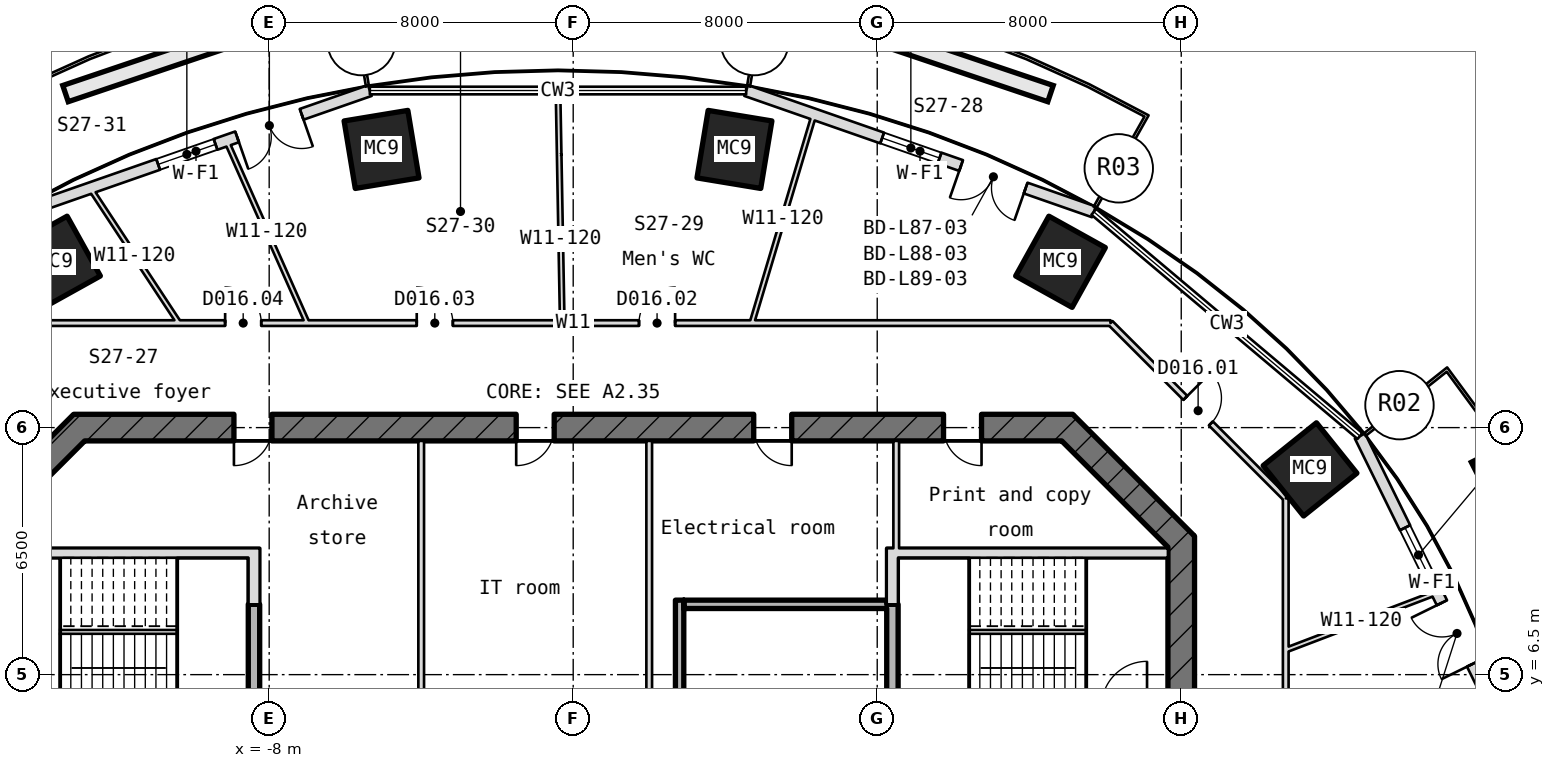
"""IFC4 building model, lengths in metres.
Left out: names, types, materials, properties, quantities, classifications, styles, units other than length and angle.
Written with IfcOpenShell. Run it as: python <this file> out.ifc"""

import sys

from ifc_helpers import new_model, si_unit, direction, frame, frame_2d, origin, origin_2d, place, context, subcontext, project, spatial, rectangle, hollow_rectangle, extrude, element, fill, save


model = new_model("IFC4")
c1 = context("Model", 3, precision=1e-05, world=origin(), true_north=direction((0.0, 1.0)))
c2 = subcontext(c1, "Body", "Model", "MODEL_VIEW")
j1 = project(units=[si_unit("LENGTHUNIT", "METRE"), si_unit("PLANEANGLEUNIT", "RADIAN")], contexts=[c1])
p1 = place(None, origin())
s1 = spatial("IfcSite", under=j1, at=p1, CompositionType="ELEMENT")
p2 = place(p1, origin())
s2 = spatial("IfcBuilding", under=s1, at=p2, CompositionType="ELEMENT")
p3 = place(p2, frame((0.0, 0.0, 384.1)))
s3 = spatial("IfcBuildingStorey", under=s2, at=p3, CompositionType="ELEMENT", Elevation=384.1)
for number, where, z_axis, x_axis in (
    (1, (19.389, 11.9, -0.18), (0.0, 0.0, 1.0), (0.626, -0.78, 0.0)),
    (2, (12.823, 17.363, -0.18), (0.0, 0.0, 1.0), (0.874, -0.486, 0.0)),
    (3, (4.243, 20.32, -0.18), (0.0, 0.0, 1.0), (0.987, -0.163, 0.0)),
    (4, (-5.043, 20.32, -0.18), (0.0, 0.0, 1.0), (0.987, 0.163, 0.0)),
    (5, (-13.623, 17.363, -0.18), (0.0, 0.0, 1.0), (0.874, 0.486, 0.0)),
):
    element("IfcColumn", number, at=place(p3, frame(where, z_axis=z_axis, x_axis=x_axis)), inside=s3, PredefinedType="COLUMN", context=c2, shape_type="SweptSolid", body=[
        extrude(hollow_rectangle(XDim=1.7, YDim=1.8, WallThickness=0.05, at=origin_2d()), origin(), (0.0, 0.0, 1.0), 4.15),
    ])
p4 = place(p3, frame((24.492, 5.071, 0.0), z_axis=(0.0, 0.0, 1.0), x_axis=(-0.441245353493, 0.897386504256, 0.0)))
e6 = element("IfcWall", 6, at=p4, inside=s3, PredefinedType="SOLIDWALL", context=c2, shape_type="SweptSolid", body=[
    extrude(rectangle(XDim=8.588, YDim=0.3, at=frame_2d((4.294, 0.0))), origin(), (0.0, 0.0, 1.0), 3.97),
])
p5 = place(p4, frame((1.9, 0.0, 0.0)))
e7 = element("IfcOpeningElement", 7, at=p5, cuts=e6, PredefinedType="OPENING", context=c2, shape_type="SweptSolid", body=[
    extrude(rectangle(XDim=1.8, YDim=2.4, at=frame_2d((0.9, 1.2))), frame((0.0, 0.16, 0.0), z_axis=(0.0, -1.0, 0.0), x_axis=(1.0, 0.0, 0.0)), (0.0, 0.0, 1.0), 0.32),
])
p6 = place(p4, frame((4.3, 0.0, 0.9)))
e8 = element("IfcOpeningElement", 8, at=p6, cuts=e6, PredefinedType="OPENING", context=c2, shape_type="SweptSolid", body=[
    extrude(rectangle(XDim=1.6, YDim=1.5, at=frame_2d((0.8, 0.75))), frame((0.0, 0.16, 0.0), z_axis=(0.0, -1.0, 0.0), x_axis=(1.0, 0.0, 0.0)), (0.0, 0.0, 1.0), 0.32),
])
p7 = place(p3, frame((13.7, 18.677, 0.0), z_axis=(0.0, 0.0, 1.0), x_axis=(-0.944174121216, 0.329446852809, 0.0)))
e9 = element("IfcWall", 9, at=p7, inside=s3, PredefinedType="SOLIDWALL", context=c2, shape_type="SweptSolid", body=[
    extrude(rectangle(XDim=9.69, YDim=0.3, at=frame_2d((4.845, 0.0))), origin(), (0.0, 0.0, 1.0), 3.97),
])
p8 = place(p7, frame((1.9, 0.0, 0.0)))
e10 = element("IfcOpeningElement", 10, at=p8, cuts=e9, PredefinedType="OPENING", context=c2, shape_type="SweptSolid", body=[
    extrude(rectangle(XDim=1.8, YDim=2.4, at=frame_2d((0.9, 1.2))), frame((0.0, 0.16, 0.0), z_axis=(0.0, -1.0, 0.0), x_axis=(1.0, 0.0, 0.0)), (0.0, 0.0, 1.0), 0.32),
])
p9 = place(p7, frame((4.3, 0.0, 0.9)))
e11 = element("IfcOpeningElement", 11, at=p9, cuts=e9, PredefinedType="OPENING", context=c2, shape_type="SweptSolid", body=[
    extrude(rectangle(XDim=1.6, YDim=1.5, at=frame_2d((0.8, 0.75))), frame((0.0, 0.16, 0.0), z_axis=(0.0, -1.0, 0.0), x_axis=(1.0, 0.0, 0.0)), (0.0, 0.0, 1.0), 0.32),
])
p10 = place(p3, frame((-5.351, 21.869, 0.0), z_axis=(0.0, 0.0, 1.0), x_axis=(-0.944174121216, -0.329446852809, 0.0)))
e12 = element("IfcWall", 12, at=p10, inside=s3, PredefinedType="SOLIDWALL", context=c2, shape_type="SweptSolid", body=[
    extrude(rectangle(XDim=9.69, YDim=0.3, at=frame_2d((4.845, 0.0))), origin(), (0.0, 0.0, 1.0), 3.97),
])
p11 = place(p10, frame((1.9, 0.0, 0.0)))
e13 = element("IfcOpeningElement", 13, at=p11, cuts=e12, PredefinedType="OPENING", context=c2, shape_type="SweptSolid", body=[
    extrude(rectangle(XDim=1.8, YDim=2.4, at=frame_2d((0.9, 1.2))), frame((0.0, 0.16, 0.0), z_axis=(0.0, -1.0, 0.0), x_axis=(1.0, 0.0, 0.0)), (0.0, 0.0, 1.0), 0.32),
])
p12 = place(p10, frame((4.3, 0.0, 0.9)))
e14 = element("IfcOpeningElement", 14, at=p12, cuts=e12, PredefinedType="OPENING", context=c2, shape_type="SweptSolid", body=[
    extrude(rectangle(XDim=1.6, YDim=1.5, at=frame_2d((0.8, 0.75))), frame((0.0, 0.16, 0.0), z_axis=(0.0, -1.0, 0.0), x_axis=(1.0, 0.0, 0.0)), (0.0, 0.0, 1.0), 0.32),
])
p13 = place(p3, frame((16.0, -10.145, -0.18), z_axis=(0.0, 0.0, 1.0), x_axis=(0.0, 1.0, 0.0)))
e15 = element("IfcWall", 15, at=p13, inside=s3, PredefinedType="SHEAR", context=c2, shape_type="SweptSolid", body=[
    extrude(rectangle(XDim=20.29, YDim=0.7, at=frame_2d((10.145, 0.0))), origin(), (0.0, 0.0, 1.0), 4.15),
])
p14 = place(p13, frame((8.945, 0.0, 0.18)))
e16 = element("IfcOpeningElement", 16, at=p14, cuts=e15, PredefinedType="OPENING", context=c2, shape_type="SweptSolid", body=[
    extrude(rectangle(XDim=2.4, YDim=2.1, at=frame_2d((1.2, 1.05))), frame((0.0, 0.36, 0.0), z_axis=(0.0, -1.0, 0.0), x_axis=(1.0, 0.0, 0.0)), (0.0, 0.0, 1.0), 0.72),
])
p15 = place(p13, frame((13.545, 0.0, 0.18)))
e17 = element("IfcOpeningElement", 17, at=p15, cuts=e15, PredefinedType="OPENING", context=c2, shape_type="SweptSolid", body=[
    extrude(rectangle(XDim=1.2, YDim=2.1, at=frame_2d((0.6, 1.05))), frame((0.0, 0.36, 0.0), z_axis=(0.0, -1.0, 0.0), x_axis=(1.0, 0.0, 0.0)), (0.0, 0.0, 1.0), 0.72),
])
p16 = place(p13, frame((2.4, 0.0, 0.18)))
e18 = element("IfcOpeningElement", 18, at=p16, cuts=e15, PredefinedType="OPENING", context=c2, shape_type="SweptSolid", body=[
    extrude(rectangle(XDim=1.2, YDim=2.1, at=frame_2d((0.6, 1.05))), frame((0.0, 0.36, 0.0), z_axis=(0.0, -1.0, 0.0), x_axis=(1.0, 0.0, 0.0)), (0.0, 0.0, 1.0), 0.72),
])
p17 = place(p3, frame((16.103, 9.897, -0.18), z_axis=(0.0, 0.0, 1.0), x_axis=(-0.707106781187, 0.707106781187, 0.0)))
e19 = element("IfcWall", 19, at=p17, inside=s3, PredefinedType="SHEAR", context=c2, shape_type="SweptSolid", body=[
    extrude(rectangle(XDim=4.533, YDim=0.7, at=frame_2d((2.266, 0.0))), origin(), (0.0, 0.0, 1.0), 4.15),
])
p18 = place(p3, frame((13.145, 13.0, -0.18), z_axis=(0.0, 0.0, 1.0), x_axis=(-1.0, 0.0, 0.0)))
e20 = element("IfcWall", 20, at=p18, inside=s3, PredefinedType="SHEAR", context=c2, shape_type="SweptSolid", body=[
    extrude(rectangle(XDim=26.29, YDim=0.7, at=frame_2d((13.145, 0.0))), origin(), (0.0, 0.0, 1.0), 4.15),
])
p19 = place(p18, frame((21.073, 0.0, 0.18)))
e21 = element("IfcOpeningElement", 21, at=p19, cuts=e20, PredefinedType="OPENING", context=c2, shape_type="SweptSolid", body=[
    extrude(rectangle(XDim=1.0, YDim=2.1, at=frame_2d((0.5, 1.05))), frame((0.0, 0.36, 0.0), z_axis=(0.0, -1.0, 0.0), x_axis=(1.0, 0.0, 0.0)), (0.0, 0.0, 1.0), 0.72),
])
p20 = place(p18, frame((13.645, 0.0, 0.18)))
e22 = element("IfcOpeningElement", 22, at=p20, cuts=e20, PredefinedType="OPENING", context=c2, shape_type="SweptSolid", body=[
    extrude(rectangle(XDim=1.0, YDim=2.1, at=frame_2d((0.5, 1.05))), frame((0.0, 0.36, 0.0), z_axis=(0.0, -1.0, 0.0), x_axis=(1.0, 0.0, 0.0)), (0.0, 0.0, 1.0), 0.72),
])
p21 = place(p18, frame((7.395, 0.0, 0.18)))
e23 = element("IfcOpeningElement", 23, at=p21, cuts=e20, PredefinedType="OPENING", context=c2, shape_type="SweptSolid", body=[
    extrude(rectangle(XDim=1.0, YDim=2.1, at=frame_2d((0.5, 1.05))), frame((0.0, 0.36, 0.0), z_axis=(0.0, -1.0, 0.0), x_axis=(1.0, 0.0, 0.0)), (0.0, 0.0, 1.0), 0.72),
])
p22 = place(p18, frame((2.4, 0.0, 0.18)))
e24 = element("IfcOpeningElement", 24, at=p22, cuts=e20, PredefinedType="OPENING", context=c2, shape_type="SweptSolid", body=[
    extrude(rectangle(XDim=1.0, YDim=2.1, at=frame_2d((0.5, 1.05))), frame((0.0, 0.36, 0.0), z_axis=(0.0, -1.0, 0.0), x_axis=(1.0, 0.0, 0.0)), (0.0, 0.0, 1.0), 0.72),
])
p23 = place(p3, frame((-12.897, 13.103, -0.18), z_axis=(0.0, 0.0, 1.0), x_axis=(-0.707106781187, -0.707106781187, 0.0)))
e25 = element("IfcWall", 25, at=p23, inside=s3, PredefinedType="SHEAR", context=c2, shape_type="SweptSolid", body=[
    extrude(rectangle(XDim=4.533, YDim=0.7, at=frame_2d((2.266, 0.0))), origin(), (0.0, 0.0, 1.0), 4.15),
])
p24 = place(p3, frame((2.91, 8.35, 0.0), z_axis=(0.0, 0.0, 1.0), x_axis=(1.0, 0.0, 0.0)))
e26 = element("IfcWall", 26, at=p24, inside=s3, PredefinedType="STANDARD", context=c2, shape_type="SweptSolid", body=[
    extrude(rectangle(XDim=5.34, YDim=0.22, at=frame_2d((2.67, 0.0))), origin(), (0.0, 0.0, 1.0), 3.97),
])
for number, where, z_axis, x_axis in (
    (27, (-15.65, 9.7, -0.18), (0.0, 0.0, 1.0), (1.0, 0.0, 0.0)),
    (28, (8.55, 9.7, -0.18), (0.0, 0.0, 1.0), (1.0, 0.0, 0.0)),
):
    element("IfcWall", number, at=place(p3, frame(where, z_axis=z_axis, x_axis=x_axis)), inside=s3, PredefinedType="SHEAR", context=c2, shape_type="SweptSolid", body=[
        extrude(rectangle(XDim=7.1, YDim=0.25, at=frame_2d((3.55, 0.0))), origin(), (0.0, 0.0, 1.0), 4.15),
    ])
p25 = place(p3, frame((-8.4, 2.5, -0.18), z_axis=(0.0, 0.0, 1.0), x_axis=(0.0, 1.0, 0.0)))
e29 = element("IfcWall", 29, at=p25, inside=s3, PredefinedType="SHEAR", context=c2, shape_type="SweptSolid", body=[
    extrude(rectangle(XDim=5.85, YDim=0.3, at=frame_2d((2.925, 0.0))), origin(), (0.0, 0.0, 1.0), 4.15),
])
p26 = place(p3, frame((-8.4, 8.35, -0.18), z_axis=(0.0, 0.0, 1.0), x_axis=(0.0, 1.0, 0.0)))
e30 = element("IfcWall", 30, at=p26, inside=s3, PredefinedType="SHEAR", context=c2, shape_type="SweptSolid", body=[
    extrude(rectangle(XDim=1.475, YDim=0.3, at=frame_2d((0.737, 0.0))), origin(), (0.0, 0.0, 1.0), 4.15),
])
for number, where, z_axis, x_axis in (
    (31, (-4.0, 5.425, 0.0), (0.0, 0.0, 1.0), (0.0, 1.0, 0.0)),
    (32, (2.0, 5.425, 0.0), (0.0, 0.0, 1.0), (0.0, 1.0, 0.0)),
):
    element("IfcWall", number, at=place(p3, frame(where, z_axis=z_axis, x_axis=x_axis)), inside=s3, PredefinedType="PARTITIONING", context=c2, shape_type="SweptSolid", body=[
        extrude(rectangle(XDim=7.225, YDim=0.15, at=frame_2d((3.612, 0.0))), origin(), (0.0, 0.0, 1.0), 3.97),
    ])
p27 = place(p3, frame((2.8, 5.46, 0.0), z_axis=(0.0, 0.0, 1.0), x_axis=(0.0, 1.0, 0.0)))
e33 = element("IfcWall", 33, at=p27, inside=s3, PredefinedType="STANDARD", context=c2, shape_type="SweptSolid", body=[
    extrude(rectangle(XDim=3.0, YDim=0.22, at=frame_2d((1.5, 0.0))), origin(), (0.0, 0.0, 1.0), 3.97),
])
p28 = place(p3, frame((8.4, 2.5, -0.18), z_axis=(0.0, 0.0, 1.0), x_axis=(0.0, 1.0, 0.0)))
e34 = element("IfcWall", 34, at=p28, inside=s3, PredefinedType="SHEAR", context=c2, shape_type="SweptSolid", body=[
    extrude(rectangle(XDim=5.85, YDim=0.3, at=frame_2d((2.925, 0.0))), origin(), (0.0, 0.0, 1.0), 4.15),
])
p29 = place(p3, frame((8.4, 8.35, -0.18), z_axis=(0.0, 0.0, 1.0), x_axis=(0.0, 1.0, 0.0)))
e35 = element("IfcWall", 35, at=p29, inside=s3, PredefinedType="SHEAR", context=c2, shape_type="SweptSolid", body=[
    extrude(rectangle(XDim=1.475, YDim=0.3, at=frame_2d((0.737, 0.0))), origin(), (0.0, 0.0, 1.0), 4.15),
])
p30 = place(p3, frame((8.5, 9.825, 0.0), z_axis=(0.0, 0.0, 1.0), x_axis=(0.0, 1.0, 0.0)))
e36 = element("IfcWall", 36, at=p30, inside=s3, PredefinedType="PARTITIONING", context=c2, shape_type="SweptSolid", body=[
    extrude(rectangle(XDim=2.825, YDim=0.15, at=frame_2d((1.413, 0.0))), origin(), (0.0, 0.0, 1.0), 3.97),
])
p31 = place(p3, frame((-14.139, 15.75, 0.0), z_axis=(0.0, 0.0, 1.0), x_axis=(1.0, 0.0, 0.0)))
e37 = element("IfcWall", 37, at=p31, inside=s3, PredefinedType="PARTITIONING", context=c2, shape_type="SweptSolid", body=[
    extrude(rectangle(XDim=28.278, YDim=0.15, at=frame_2d((14.139, 0.0))), origin(), (0.0, 0.0, 1.0), 3.97),
])
p32 = place(p31, frame((15.871, 0.0, 0.0)))
e38 = element("IfcOpeningElement", 38, at=p32, cuts=e37, PredefinedType="OPENING", context=c2, shape_type="SweptSolid", body=[
    extrude(rectangle(XDim=0.95, YDim=2.1, at=frame_2d((0.475, 1.05))), frame((0.0, 0.085, 0.0), z_axis=(0.0, -1.0, 0.0), x_axis=(1.0, 0.0, 0.0)), (0.0, 0.0, 1.0), 0.17),
])
p33 = place(p31, frame((10.022, 0.0, 0.0)))
e39 = element("IfcOpeningElement", 39, at=p33, cuts=e37, PredefinedType="OPENING", context=c2, shape_type="SweptSolid", body=[
    extrude(rectangle(XDim=0.95, YDim=2.1, at=frame_2d((0.475, 1.05))), frame((0.0, 0.085, 0.0), z_axis=(0.0, -1.0, 0.0), x_axis=(1.0, 0.0, 0.0)), (0.0, 0.0, 1.0), 0.17),
])
p34 = place(p31, frame((4.98, 0.0, 0.0)))
e40 = element("IfcOpeningElement", 40, at=p34, cuts=e37, PredefinedType="OPENING", context=c2, shape_type="SweptSolid", body=[
    extrude(rectangle(XDim=0.95, YDim=2.1, at=frame_2d((0.475, 1.05))), frame((0.0, 0.085, 0.0), z_axis=(0.0, -1.0, 0.0), x_axis=(1.0, 0.0, 0.0)), (0.0, 0.0, 1.0), 0.17),
])
p35 = place(p3, frame((-10.373, 15.75, 0.0), z_axis=(0.0, 0.0, 1.0), x_axis=(-0.550014013295, 0.835155425762, 0.0)))
e41 = element("IfcWall", 41, at=p35, inside=s3, PredefinedType="PARTITIONING", context=c2, shape_type="SweptSolid", body=[
    extrude(rectangle(XDim=4.252, YDim=0.12, at=frame_2d((2.126, 0.0))), origin(), (0.0, 0.0, 1.0), 3.97),
])
p36 = place(p3, frame((-6.996, 15.75, 0.0), z_axis=(0.0, 0.0, 1.0), x_axis=(-0.405909939035, 0.913913081968, 0.0)))
e42 = element("IfcWall", 42, at=p36, inside=s3, PredefinedType="PARTITIONING", context=c2, shape_type="SweptSolid", body=[
    extrude(rectangle(XDim=5.254, YDim=0.12, at=frame_2d((2.627, 0.0))), origin(), (0.0, 0.0, 1.0), 3.97),
])
p37 = place(p3, frame((-0.288, 15.75, 0.0), z_axis=(0.0, 0.0, 1.0), x_axis=(-0.018290966414, 0.99983270628, 0.0)))
e43 = element("IfcWall", 43, at=p37, inside=s3, PredefinedType="PARTITIONING", context=c2, shape_type="SweptSolid", body=[
    extrude(rectangle(XDim=4.431, YDim=0.12, at=frame_2d((2.216, 0.0))), origin(), (0.0, 0.0, 1.0), 3.66),
])
p38 = place(p3, frame((-0.369, 20.181, 0.0), z_axis=(0.0, 0.0, 1.0), x_axis=(-0.018215600688, 0.999834082181, 0.0)))
e44 = element("IfcWall", 44, at=p38, inside=s3, PredefinedType="PARTITIONING", context=c2, shape_type="SweptSolid", body=[
    extrude(rectangle(XDim=1.689, YDim=0.12, at=frame_2d((0.844, 0.0))), origin(), (0.0, 0.0, 1.0), 3.97),
])
p39 = place(p3, frame((4.701, 15.75, 0.0), z_axis=(0.0, 0.0, 1.0), x_axis=(0.285976596547, 0.958236602425, 0.0)))
e45 = element("IfcWall", 45, at=p39, inside=s3, PredefinedType="PARTITIONING", context=c2, shape_type="SweptSolid", body=[
    extrude(rectangle(XDim=5.734, YDim=0.12, at=frame_2d((2.867, 0.0))), origin(), (0.0, 0.0, 1.0), 3.97),
])
p40 = place(p3, frame((14.139, 15.75, 0.0), z_axis=(0.0, 0.0, 1.0), x_axis=(0.707106781187, -0.707106781187, 0.0)))
e46 = element("IfcWall", 46, at=p40, inside=s3, PredefinedType="PARTITIONING", context=c2, shape_type="SweptSolid", body=[
    extrude(rectangle(XDim=6.521, YDim=0.15, at=frame_2d((3.26, 0.0))), origin(), (0.0, 0.0, 1.0), 3.97),
])
p41 = place(p40, frame((2.785, 0.0, 0.0)))
e47 = element("IfcOpeningElement", 47, at=p41, cuts=e46, PredefinedType="OPENING", context=c2, shape_type="SweptSolid", body=[
    extrude(rectangle(XDim=0.95, YDim=2.1, at=frame_2d((0.475, 1.05))), frame((0.0, 0.085, 0.0), z_axis=(0.0, -1.0, 0.0), x_axis=(1.0, 0.0, 0.0)), (0.0, 0.0, 1.0), 0.17),
])
p42 = place(p3, frame((18.75, 7.145, 0.0), z_axis=(0.0, 0.0, 1.0), x_axis=(0.934470468692, 0.35604064816, 0.0)))
e48 = element("IfcWall", 48, at=p42, inside=s3, PredefinedType="PARTITIONING", context=c2, shape_type="SweptSolid", body=[
    extrude(rectangle(XDim=4.256, YDim=0.12, at=frame_2d((2.128, 0.0))), origin(), (0.0, 0.0, 1.0), 3.97),
])
p43 = place(p3, frame((18.75, 11.139, 0.0), z_axis=(0.0, 0.0, 1.0), x_axis=(0.0, -1.0, 0.0)))
e49 = element("IfcWall", 49, at=p43, inside=s3, PredefinedType="PARTITIONING", context=c2, shape_type="SweptSolid", body=[
    extrude(rectangle(XDim=20.518, YDim=0.15, at=frame_2d((10.259, 0.0))), origin(), (0.0, 0.0, 1.0), 3.97),
])
p44 = place(p43, frame((9.75, 0.0, 0.0)))
e50 = element("IfcOpeningElement", 50, at=p44, cuts=e49, PredefinedType="OPENING", context=c2, shape_type="SweptSolid", body=[
    extrude(rectangle(XDim=1.8, YDim=2.1, at=frame_2d((0.9, 1.05))), frame((0.0, 0.085, 0.0), z_axis=(0.0, -1.0, 0.0), x_axis=(1.0, 0.0, 0.0)), (0.0, 0.0, 1.0), 0.17),
])
p45 = place(p5, origin())
e51 = element("IfcDoor", 51, at=p45, inside=s3, OperationType="SINGLE_SWING_LEFT", PredefinedType="DOOR", context=c2, shape_type="SweptSolid", body=[
    extrude(rectangle(XDim=1.8, YDim=2.4, at=frame_2d((0.9, 1.2))), frame((0.0, 0.025, 0.0), z_axis=(0.0, -1.0, 0.0), x_axis=(1.0, 0.0, 0.0)), (0.0, 0.0, 1.0), 0.05),
])
fill(e7, e51)
p46 = place(p6, origin())
e52 = element("IfcWindow", 52, at=p46, inside=s3, PartitioningType="SINGLE_PANEL", PredefinedType="WINDOW", context=c2, shape_type="SweptSolid", body=[
    extrude(rectangle(XDim=1.6, YDim=1.5, at=frame_2d((0.8, 0.75))), frame((0.0, 0.03, 0.0), z_axis=(0.0, -1.0, 0.0), x_axis=(1.0, 0.0, 0.0)), (0.0, 0.0, 1.0), 0.06),
])
fill(e8, e52)
p47 = place(p8, origin())
e53 = element("IfcDoor", 53, at=p47, inside=s3, OperationType="SINGLE_SWING_LEFT", PredefinedType="DOOR", context=c2, shape_type="SweptSolid", body=[
    extrude(rectangle(XDim=1.8, YDim=2.4, at=frame_2d((0.9, 1.2))), frame((0.0, 0.025, 0.0), z_axis=(0.0, -1.0, 0.0), x_axis=(1.0, 0.0, 0.0)), (0.0, 0.0, 1.0), 0.05),
])
fill(e10, e53)
p48 = place(p9, origin())
e54 = element("IfcWindow", 54, at=p48, inside=s3, PartitioningType="SINGLE_PANEL", PredefinedType="WINDOW", context=c2, shape_type="SweptSolid", body=[
    extrude(rectangle(XDim=1.6, YDim=1.5, at=frame_2d((0.8, 0.75))), frame((0.0, 0.03, 0.0), z_axis=(0.0, -1.0, 0.0), x_axis=(1.0, 0.0, 0.0)), (0.0, 0.0, 1.0), 0.06),
])
fill(e11, e54)
p49 = place(p11, origin())
e55 = element("IfcDoor", 55, at=p49, inside=s3, OperationType="SINGLE_SWING_LEFT", PredefinedType="DOOR", context=c2, shape_type="SweptSolid", body=[
    extrude(rectangle(XDim=1.8, YDim=2.4, at=frame_2d((0.9, 1.2))), frame((0.0, 0.025, 0.0), z_axis=(0.0, -1.0, 0.0), x_axis=(1.0, 0.0, 0.0)), (0.0, 0.0, 1.0), 0.05),
])
fill(e13, e55)
p50 = place(p12, origin())
e56 = element("IfcWindow", 56, at=p50, inside=s3, PartitioningType="SINGLE_PANEL", PredefinedType="WINDOW", context=c2, shape_type="SweptSolid", body=[
    extrude(rectangle(XDim=1.6, YDim=1.5, at=frame_2d((0.8, 0.75))), frame((0.0, 0.03, 0.0), z_axis=(0.0, -1.0, 0.0), x_axis=(1.0, 0.0, 0.0)), (0.0, 0.0, 1.0), 0.06),
])
fill(e14, e56)
p51 = place(p19, origin())
e57 = element("IfcDoor", 57, at=p51, inside=s3, OperationType="SINGLE_SWING_RIGHT", PredefinedType="DOOR", context=c2, shape_type="SweptSolid", body=[
    extrude(rectangle(XDim=1.0, YDim=2.1, at=frame_2d((0.5, 1.05))), frame((0.0, 0.025, 0.0), z_axis=(0.0, -1.0, 0.0), x_axis=(1.0, 0.0, 0.0)), (0.0, 0.0, 1.0), 0.05),
])
fill(e21, e57)
p52 = place(p20, origin())
e58 = element("IfcDoor", 58, at=p52, inside=s3, OperationType="SINGLE_SWING_RIGHT", PredefinedType="DOOR", context=c2, shape_type="SweptSolid", body=[
    extrude(rectangle(XDim=1.0, YDim=2.1, at=frame_2d((0.5, 1.05))), frame((0.0, 0.025, 0.0), z_axis=(0.0, -1.0, 0.0), x_axis=(1.0, 0.0, 0.0)), (0.0, 0.0, 1.0), 0.05),
])
fill(e22, e58)
p53 = place(p21, origin())
e59 = element("IfcDoor", 59, at=p53, inside=s3, OperationType="SINGLE_SWING_RIGHT", PredefinedType="DOOR", context=c2, shape_type="SweptSolid", body=[
    extrude(rectangle(XDim=1.0, YDim=2.1, at=frame_2d((0.5, 1.05))), frame((0.0, 0.025, 0.0), z_axis=(0.0, -1.0, 0.0), x_axis=(1.0, 0.0, 0.0)), (0.0, 0.0, 1.0), 0.05),
])
fill(e23, e59)
p54 = place(p22, origin())
e60 = element("IfcDoor", 60, at=p54, inside=s3, OperationType="SINGLE_SWING_RIGHT", PredefinedType="DOOR", context=c2, shape_type="SweptSolid", body=[
    extrude(rectangle(XDim=1.0, YDim=2.1, at=frame_2d((0.5, 1.05))), frame((0.0, 0.025, 0.0), z_axis=(0.0, -1.0, 0.0), x_axis=(1.0, 0.0, 0.0)), (0.0, 0.0, 1.0), 0.05),
])
fill(e24, e60)
p55 = place(p41, origin())
e61 = element("IfcDoor", 61, at=p55, inside=s3, OperationType="SINGLE_SWING_RIGHT", PredefinedType="DOOR", context=c2, shape_type="SweptSolid", body=[
    extrude(rectangle(XDim=0.95, YDim=2.1, at=frame_2d((0.475, 1.05))), frame((0.0, 0.025, 0.0), z_axis=(0.0, -1.0, 0.0), x_axis=(1.0, 0.0, 0.0)), (0.0, 0.0, 1.0), 0.05),
])
fill(e47, e61)
p56 = place(p32, origin())
e62 = element("IfcDoor", 62, at=p56, inside=s3, OperationType="SINGLE_SWING_RIGHT", PredefinedType="DOOR", context=c2, shape_type="SweptSolid", body=[
    extrude(rectangle(XDim=0.95, YDim=2.1, at=frame_2d((0.475, 1.05))), frame((0.0, 0.025, 0.0), z_axis=(0.0, -1.0, 0.0), x_axis=(1.0, 0.0, 0.0)), (0.0, 0.0, 1.0), 0.05),
])
fill(e38, e62)
p57 = place(p33, origin())
e63 = element("IfcDoor", 63, at=p57, inside=s3, OperationType="SINGLE_SWING_RIGHT", PredefinedType="DOOR", context=c2, shape_type="SweptSolid", body=[
    extrude(rectangle(XDim=0.95, YDim=2.1, at=frame_2d((0.475, 1.05))), frame((0.0, 0.025, 0.0), z_axis=(0.0, -1.0, 0.0), x_axis=(1.0, 0.0, 0.0)), (0.0, 0.0, 1.0), 0.05),
])
fill(e39, e63)
p58 = place(p34, origin())
e64 = element("IfcDoor", 64, at=p58, inside=s3, OperationType="SINGLE_SWING_RIGHT", PredefinedType="DOOR", context=c2, shape_type="SweptSolid", body=[
    extrude(rectangle(XDim=0.95, YDim=2.1, at=frame_2d((0.475, 1.05))), frame((0.0, 0.025, 0.0), z_axis=(0.0, -1.0, 0.0), x_axis=(1.0, 0.0, 0.0)), (0.0, 0.0, 1.0), 0.05),
])
fill(e40, e64)
save(model, sys.argv[1])
